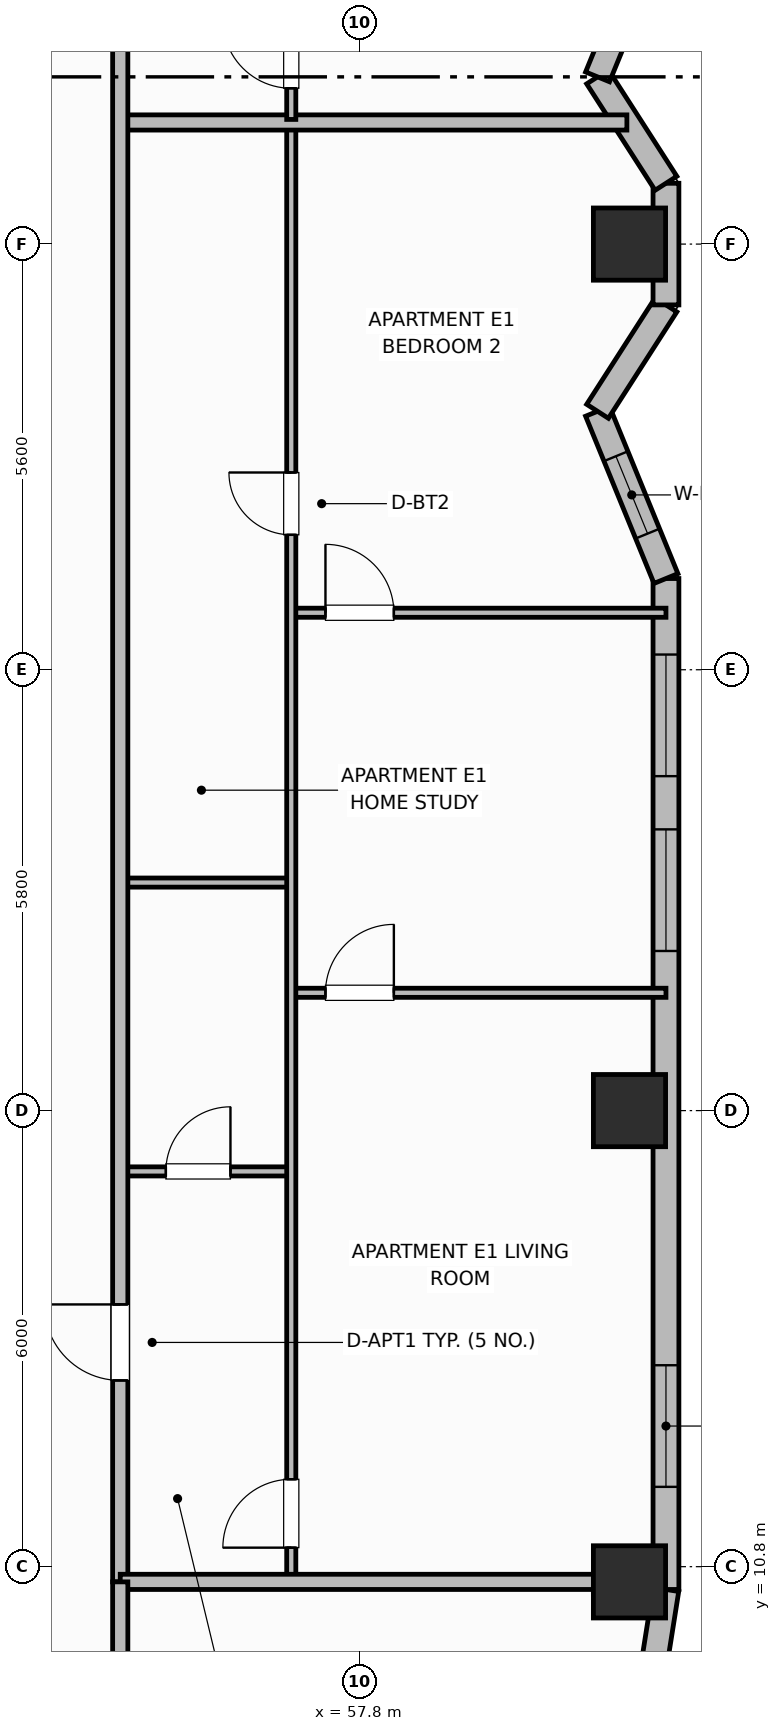
"""IFC4 building model, lengths in metres.
Left out: names, types, materials, properties, quantities, classifications, styles, units other than length and angle.
Written with IfcOpenShell. Run it as: python <this file> out.ifc"""

import sys

from ifc_helpers import new_model, si_unit, direction, frame, frame_2d, origin, origin_2d, place, context, subcontext, project, spatial, rectangle, extrude, element, fill, save


model = new_model("IFC4")
c1 = context("Model", 3, precision=1e-05, world=origin(), true_north=direction((0.0, 1.0)))
c2 = subcontext(c1, "Body", "Model", "MODEL_VIEW")
j1 = project(units=[si_unit("LENGTHUNIT", "METRE"), si_unit("PLANEANGLEUNIT", "RADIAN")], contexts=[c1])
p1 = place(None, origin())
s1 = spatial("IfcSite", under=j1, at=p1, CompositionType="ELEMENT")
p2 = place(p1, origin())
s2 = spatial("IfcBuilding", under=s1, at=p2, CompositionType="ELEMENT")
p3 = place(p2, frame((0.0, 0.0, 162.6)))
s3 = spatial("IfcBuildingStorey", under=s2, at=p3, CompositionType="ELEMENT", Elevation=162.6)
for number, where, z_axis, x_axis in (
    (1, (61.35, 10.6, 0.0), (0.0, 0.0, 1.0), (1.0, 0.0, 0.0)),
    (2, (61.35, 16.8, 0.0), (0.0, 0.0, 1.0), (1.0, 0.0, 0.0)),
    (3, (61.35, 28.2, 0.0), (0.0, 0.0, 1.0), (1.0, 0.0, 0.0)),
):
    element("IfcColumn", number, at=place(p3, frame(where, z_axis=z_axis, x_axis=x_axis)), inside=s3, PredefinedType="COLUMN", context=c2, shape_type="SweptSolid", body=[
        extrude(rectangle(XDim=0.95, YDim=0.95, at=origin_2d()), origin(), (0.0, 0.0, 1.0), 3.7),
    ])
p4 = place(p3, frame((61.652, 9.378, 0.0), z_axis=(0.0, 0.0, 1.0), x_axis=(0.156514556949, 0.987675651954, 0.0)))
e4 = element("IfcWall", 4, at=p4, inside=s3, PredefinedType="SOLIDWALL", context=c2, shape_type="SweptSolid", body=[
    extrude(rectangle(XDim=1.135, YDim=0.34, at=frame_2d((0.568, 0.0))), origin(), (0.0, 0.0, 1.0), 2.72),
])
p5 = place(p3, frame((61.83, 10.5, 0.0), z_axis=(0.0, 0.0, 1.0), x_axis=(0.0, 1.0, 0.0)))
e5 = element("IfcWall", 5, at=p5, inside=s3, PredefinedType="SOLIDWALL", context=c2, shape_type="SweptSolid", body=[
    extrude(rectangle(XDim=13.3, YDim=0.34, at=frame_2d((6.65, 0.0))), origin(), (0.0, 0.0, 1.0), 2.72),
])
p6 = place(p5, frame((1.35, 0.0, 0.7)))
e6 = element("IfcOpeningElement", 6, at=p6, cuts=e5, PredefinedType="OPENING", context=c2, shape_type="SweptSolid", body=[
    extrude(rectangle(XDim=1.6, YDim=1.9, at=frame_2d((0.8, 0.95))), frame((0.0, 0.18, 0.0), z_axis=(0.0, -1.0, 0.0), x_axis=(1.0, 0.0, 0.0)), (0.0, 0.0, 1.0), 0.36),
])
p7 = place(p5, frame((8.4, 0.0, 0.7)))
e7 = element("IfcOpeningElement", 7, at=p7, cuts=e5, PredefinedType="OPENING", context=c2, shape_type="SweptSolid", body=[
    extrude(rectangle(XDim=1.6, YDim=1.9, at=frame_2d((0.8, 0.95))), frame((0.0, 0.18, 0.0), z_axis=(0.0, -1.0, 0.0), x_axis=(1.0, 0.0, 0.0)), (0.0, 0.0, 1.0), 0.36),
])
p8 = place(p5, frame((10.7, 0.0, 0.7)))
e8 = element("IfcOpeningElement", 8, at=p8, cuts=e5, PredefinedType="OPENING", context=c2, shape_type="SweptSolid", body=[
    extrude(rectangle(XDim=1.6, YDim=1.9, at=frame_2d((0.8, 0.95))), frame((0.0, 0.18, 0.0), z_axis=(0.0, -1.0, 0.0), x_axis=(1.0, 0.0, 0.0)), (0.0, 0.0, 1.0), 0.36),
])
p9 = place(p3, frame((61.83, 23.8, 0.0), z_axis=(0.0, 0.0, 1.0), x_axis=(-0.378692835005, 0.925522412865, 0.0)))
e9 = element("IfcWall", 9, at=p9, inside=s3, PredefinedType="SOLIDWALL", context=c2, shape_type="SweptSolid", body=[
    extrude(rectangle(XDim=2.377, YDim=0.34, at=frame_2d((1.188, 0.0))), origin(), (0.0, 0.0, 1.0), 2.72),
])
p10 = place(p9, frame((0.638, 0.0, 0.91)))
e10 = element("IfcOpeningElement", 10, at=p10, cuts=e9, PredefinedType="OPENING", context=c2, shape_type="SweptSolid", body=[
    extrude(rectangle(XDim=1.1, YDim=1.65, at=frame_2d((0.55, 0.825))), frame((0.0, 0.18, 0.0), z_axis=(0.0, -1.0, 0.0), x_axis=(1.0, 0.0, 0.0)), (0.0, 0.0, 1.0), 0.36),
])
p11 = place(p3, frame((60.93, 26.0, 0.0), z_axis=(0.0, 0.0, 1.0), x_axis=(0.540846555596, 0.841121277403, 0.0)))
e11 = element("IfcWall", 11, at=p11, inside=s3, PredefinedType="SOLIDWALL", context=c2, shape_type="SweptSolid", body=[
    extrude(rectangle(XDim=1.664, YDim=0.34, at=frame_2d((0.832, 0.0))), origin(), (0.0, 0.0, 1.0), 2.72),
])
p12 = place(p3, frame((61.83, 27.4, 0.0), z_axis=(0.0, 0.0, 1.0), x_axis=(0.0, 1.0, 0.0)))
e12 = element("IfcWall", 12, at=p12, inside=s3, PredefinedType="SOLIDWALL", context=c2, shape_type="SweptSolid", body=[
    extrude(rectangle(XDim=1.6, YDim=0.34, at=frame_2d((0.8, 0.0))), origin(), (0.0, 0.0, 1.0), 2.72),
])
p13 = place(p3, frame((61.83, 29.0, 0.0), z_axis=(0.0, 0.0, 1.0), x_axis=(-0.540846555596, 0.841121277403, 0.0)))
e13 = element("IfcWall", 13, at=p13, inside=s3, PredefinedType="SOLIDWALL", context=c2, shape_type="SweptSolid", body=[
    extrude(rectangle(XDim=1.664, YDim=0.34, at=frame_2d((0.832, 0.0))), origin(), (0.0, 0.0, 1.0), 2.72),
])
p14 = place(p3, frame((60.93, 30.4, 0.0), z_axis=(0.0, 0.0, 1.0), x_axis=(0.378656839344, 0.925537140269, 0.0)))
e14 = element("IfcWall", 14, at=p14, inside=s3, PredefinedType="SOLIDWALL", context=c2, shape_type="SweptSolid", body=[
    extrude(rectangle(XDim=2.377, YDim=0.34, at=frame_2d((1.188, 0.0))), origin(), (0.0, 0.0, 1.0), 2.72),
])
p15 = place(p14, frame((0.638, 0.0, 0.91)))
e15 = element("IfcOpeningElement", 15, at=p15, cuts=e14, PredefinedType="OPENING", context=c2, shape_type="SweptSolid", body=[
    extrude(rectangle(XDim=1.1, YDim=1.65, at=frame_2d((0.55, 0.825))), frame((0.0, 0.18, 0.0), z_axis=(0.0, -1.0, 0.0), x_axis=(1.0, 0.0, 0.0)), (0.0, 0.0, 1.0), 0.36),
])
p16 = place(p3, frame((54.65, 16.0, 0.0), z_axis=(0.0, 0.0, 1.0), x_axis=(1.0, 0.0, 0.0)))
e16 = element("IfcWall", 16, at=p16, inside=s3, PredefinedType="PARTITIONING", context=c2, shape_type="SweptSolid", body=[
    extrude(rectangle(XDim=2.25, YDim=0.12, at=frame_2d((1.125, 0.0))), origin(), (0.0, 0.0, 1.0), 2.55),
])
p17 = place(p16, frame((0.6, 0.0, 0.0)))
e17 = element("IfcOpeningElement", 17, at=p17, cuts=e16, PredefinedType="OPENING", context=c2, shape_type="SweptSolid", body=[
    extrude(rectangle(XDim=0.85, YDim=2.1, at=frame_2d((0.425, 1.05))), frame((0.0, 0.07, 0.0), z_axis=(0.0, -1.0, 0.0), x_axis=(1.0, 0.0, 0.0)), (0.0, 0.0, 1.0), 0.14),
])
p18 = place(p3, frame((54.65, 19.8, 0.0), z_axis=(0.0, 0.0, 1.0), x_axis=(1.0, 0.0, 0.0)))
e18 = element("IfcWall", 18, at=p18, inside=s3, PredefinedType="PARTITIONING", context=c2, shape_type="SweptSolid", body=[
    extrude(rectangle(XDim=2.25, YDim=0.12, at=frame_2d((1.125, 0.0))), origin(), (0.0, 0.0, 1.0), 2.55),
])
p19 = place(p3, frame((56.9, 18.35, 0.0), z_axis=(0.0, 0.0, 1.0), x_axis=(1.0, 0.0, 0.0)))
e19 = element("IfcWall", 19, at=p19, inside=s3, PredefinedType="PARTITIONING", context=c2, shape_type="SweptSolid", body=[
    extrude(rectangle(XDim=4.93, YDim=0.12, at=frame_2d((2.465, 0.0))), origin(), (0.0, 0.0, 1.0), 2.55),
])
p20 = place(p19, frame((0.45, 0.0, 0.0)))
e20 = element("IfcOpeningElement", 20, at=p20, cuts=e19, PredefinedType="OPENING", context=c2, shape_type="SweptSolid", body=[
    extrude(rectangle(XDim=0.9, YDim=2.1, at=frame_2d((0.45, 1.05))), frame((0.0, 0.07, 0.0), z_axis=(0.0, -1.0, 0.0), x_axis=(1.0, 0.0, 0.0)), (0.0, 0.0, 1.0), 0.14),
])
p21 = place(p3, frame((56.9, 23.35, 0.0), z_axis=(0.0, 0.0, 1.0), x_axis=(1.0, 0.0, 0.0)))
e21 = element("IfcWall", 21, at=p21, inside=s3, PredefinedType="PARTITIONING", context=c2, shape_type="SweptSolid", body=[
    extrude(rectangle(XDim=4.93, YDim=0.12, at=frame_2d((2.465, 0.0))), origin(), (0.0, 0.0, 1.0), 2.55),
])
p22 = place(p21, frame((0.45, 0.0, 0.0)))
e22 = element("IfcOpeningElement", 22, at=p22, cuts=e21, PredefinedType="OPENING", context=c2, shape_type="SweptSolid", body=[
    extrude(rectangle(XDim=0.9, YDim=2.1, at=frame_2d((0.45, 1.05))), frame((0.0, 0.07, 0.0), z_axis=(0.0, -1.0, 0.0), x_axis=(1.0, 0.0, 0.0)), (0.0, 0.0, 1.0), 0.14),
])
p23 = place(p3, frame((56.9, 10.64, 0.0), z_axis=(0.0, 0.0, 1.0), x_axis=(0.0, 1.0, 0.0)))
e23 = element("IfcWall", 23, at=p23, inside=s3, PredefinedType="PARTITIONING", context=c2, shape_type="SweptSolid", body=[
    extrude(rectangle(XDim=19.12, YDim=0.12, at=frame_2d((9.56, 0.0))), origin(), (0.0, 0.0, 1.0), 2.55),
])
p24 = place(p23, frame((0.41, 0.0, 0.0)))
e24 = element("IfcOpeningElement", 24, at=p24, cuts=e23, PredefinedType="OPENING", context=c2, shape_type="SweptSolid", body=[
    extrude(rectangle(XDim=0.9, YDim=2.1, at=frame_2d((0.45, 1.05))), frame((0.0, 0.07, 0.0), z_axis=(0.0, -1.0, 0.0), x_axis=(1.0, 0.0, 0.0)), (0.0, 0.0, 1.0), 0.14),
])
p25 = place(p23, frame((13.735, 0.0, 0.0)))
e25 = element("IfcOpeningElement", 25, at=p25, cuts=e23, PredefinedType="OPENING", context=c2, shape_type="SweptSolid", body=[
    extrude(rectangle(XDim=0.82, YDim=2.08, at=frame_2d((0.41, 1.04))), frame((0.0, 0.07, 0.0), z_axis=(0.0, -1.0, 0.0), x_axis=(1.0, 0.0, 0.0)), (0.0, 0.0, 1.0), 0.14),
])
p26 = place(p3, frame((54.65, 29.8, 0.0), z_axis=(0.0, 0.0, 1.0), x_axis=(1.0, 0.0, 0.0)))
e26 = element("IfcWall", 26, at=p26, inside=s3, PredefinedType="PARTITIONING", context=c2, shape_type="SweptSolid", body=[
    extrude(rectangle(XDim=6.666, YDim=0.2, at=frame_2d((3.333, 0.0))), origin(), (0.0, 0.0, 1.0), 2.55),
])
p27 = place(p3, frame((56.9, 29.84, 0.0), z_axis=(0.0, 0.0, 1.0), x_axis=(0.0, 1.0, 0.0)))
e27 = element("IfcWall", 27, at=p27, inside=s3, PredefinedType="PARTITIONING", context=c2, shape_type="SweptSolid", body=[
    extrude(rectangle(XDim=15.92, YDim=0.12, at=frame_2d((7.96, 0.0))), origin(), (0.0, 0.0, 1.0), 2.55),
])
p28 = place(p27, frame((0.41, 0.0, 0.0)))
e28 = element("IfcOpeningElement", 28, at=p28, cuts=e27, PredefinedType="OPENING", context=c2, shape_type="SweptSolid", body=[
    extrude(rectangle(XDim=0.9, YDim=2.1, at=frame_2d((0.45, 1.05))), frame((0.0, 0.07, 0.0), z_axis=(0.0, -1.0, 0.0), x_axis=(1.0, 0.0, 0.0)), (0.0, 0.0, 1.0), 0.14),
])
p29 = place(p27, frame((13.125, 0.0, 0.0)))
e29 = element("IfcOpeningElement", 29, at=p29, cuts=e27, PredefinedType="OPENING", context=c2, shape_type="SweptSolid", body=[
    extrude(rectangle(XDim=0.82, YDim=2.08, at=frame_2d((0.41, 1.04))), frame((0.0, 0.07, 0.0), z_axis=(0.0, -1.0, 0.0), x_axis=(1.0, 0.0, 0.0)), (0.0, 0.0, 1.0), 0.14),
])
p30 = place(p3, frame((54.65, 10.6, 0.0), z_axis=(0.0, 0.0, 1.0), x_axis=(0.0, 1.0, 0.0)))
e30 = element("IfcWall", 30, at=p30, inside=s3, PredefinedType="PARTITIONING", context=c2, shape_type="SweptSolid", body=[
    extrude(rectangle(XDim=35.2, YDim=0.2, at=frame_2d((17.6, 0.0))), origin(), (0.0, 0.0, 1.0), 2.55),
])
p31 = place(p30, frame((2.65, 0.0, 0.0)))
e31 = element("IfcOpeningElement", 31, at=p31, cuts=e30, PredefinedType="OPENING", context=c2, shape_type="SweptSolid", body=[
    extrude(rectangle(XDim=1.0, YDim=2.15, at=frame_2d((0.5, 1.075))), frame((0.0, 0.11, 0.0), z_axis=(0.0, -1.0, 0.0), x_axis=(1.0, 0.0, 0.0)), (0.0, 0.0, 1.0), 0.22),
])
p32 = place(p30, frame((22.75, 0.0, 0.0)))
e32 = element("IfcOpeningElement", 32, at=p32, cuts=e30, PredefinedType="OPENING", context=c2, shape_type="SweptSolid", body=[
    extrude(rectangle(XDim=1.0, YDim=2.15, at=frame_2d((0.5, 1.075))), frame((0.0, 0.11, 0.0), z_axis=(0.0, -1.0, 0.0), x_axis=(1.0, 0.0, 0.0)), (0.0, 0.0, 1.0), 0.22),
])
p33 = place(p3, frame((54.65, 10.6, 0.0), z_axis=(0.0, 0.0, 1.0), x_axis=(1.0, 0.0, 0.0)))
e33 = element("IfcWall", 33, at=p33, inside=s3, PredefinedType="PARTITIONING", context=c2, shape_type="SweptSolid", body=[
    extrude(rectangle(XDim=6.76, YDim=0.2, at=frame_2d((3.38, 0.0))), origin(), (0.0, 0.0, 1.0), 2.55),
])
p34 = place(p3, frame((54.65, 6.87, 0.0), z_axis=(0.0, 0.0, 1.0), x_axis=(0.0, 1.0, 0.0)))
e34 = element("IfcWall", 34, at=p34, inside=s3, PredefinedType="PARTITIONING", context=c2, shape_type="SweptSolid", body=[
    extrude(rectangle(XDim=3.73, YDim=0.2, at=frame_2d((1.865, 0.0))), origin(), (0.0, 0.0, 1.0), 2.55),
])
p35 = place(p6, origin())
e35 = element("IfcWindow", 35, at=p35, inside=s3, PartitioningType="SINGLE_PANEL", PredefinedType="WINDOW", context=c2, shape_type="SweptSolid", body=[
    extrude(rectangle(XDim=1.6, YDim=1.9, at=frame_2d((0.8, 0.95))), frame((0.0, 0.03, 0.0), z_axis=(0.0, -1.0, 0.0), x_axis=(1.0, 0.0, 0.0)), (0.0, 0.0, 1.0), 0.06),
])
fill(e6, e35)
p36 = place(p7, origin())
e36 = element("IfcWindow", 36, at=p36, inside=s3, PartitioningType="SINGLE_PANEL", PredefinedType="WINDOW", context=c2, shape_type="SweptSolid", body=[
    extrude(rectangle(XDim=1.6, YDim=1.9, at=frame_2d((0.8, 0.95))), frame((0.0, 0.03, 0.0), z_axis=(0.0, -1.0, 0.0), x_axis=(1.0, 0.0, 0.0)), (0.0, 0.0, 1.0), 0.06),
])
fill(e7, e36)
p37 = place(p8, origin())
e37 = element("IfcWindow", 37, at=p37, inside=s3, PartitioningType="SINGLE_PANEL", PredefinedType="WINDOW", context=c2, shape_type="SweptSolid", body=[
    extrude(rectangle(XDim=1.6, YDim=1.9, at=frame_2d((0.8, 0.95))), frame((0.0, 0.03, 0.0), z_axis=(0.0, -1.0, 0.0), x_axis=(1.0, 0.0, 0.0)), (0.0, 0.0, 1.0), 0.06),
])
fill(e8, e37)
p38 = place(p10, origin())
e38 = element("IfcWindow", 38, at=p38, inside=s3, PartitioningType="SINGLE_PANEL", PredefinedType="WINDOW", context=c2, shape_type="SweptSolid", body=[
    extrude(rectangle(XDim=1.1, YDim=1.65, at=frame_2d((0.55, 0.825))), frame((0.0, 0.03, 0.0), z_axis=(0.0, -1.0, 0.0), x_axis=(1.0, 0.0, 0.0)), (0.0, 0.0, 1.0), 0.06),
])
fill(e10, e38)
p39 = place(p17, origin())
e39 = element("IfcDoor", 39, at=p39, inside=s3, OperationType="SINGLE_SWING_RIGHT", PredefinedType="DOOR", context=c2, shape_type="SweptSolid", body=[
    extrude(rectangle(XDim=0.85, YDim=2.1, at=frame_2d((0.425, 1.05))), frame((0.0, 0.025, 0.0), z_axis=(0.0, -1.0, 0.0), x_axis=(1.0, 0.0, 0.0)), (0.0, 0.0, 1.0), 0.05),
])
fill(e17, e39)
p40 = place(p20, origin())
e40 = element("IfcDoor", 40, at=p40, inside=s3, OperationType="SINGLE_SWING_RIGHT", PredefinedType="DOOR", context=c2, shape_type="SweptSolid", body=[
    extrude(rectangle(XDim=0.9, YDim=2.1, at=frame_2d((0.45, 1.05))), frame((0.0, 0.025, 0.0), z_axis=(0.0, -1.0, 0.0), x_axis=(1.0, 0.0, 0.0)), (0.0, 0.0, 1.0), 0.05),
])
fill(e20, e40)
p41 = place(p22, origin())
e41 = element("IfcDoor", 41, at=p41, inside=s3, OperationType="SINGLE_SWING_LEFT", PredefinedType="DOOR", context=c2, shape_type="SweptSolid", body=[
    extrude(rectangle(XDim=0.9, YDim=2.1, at=frame_2d((0.45, 1.05))), frame((0.0, 0.025, 0.0), z_axis=(0.0, -1.0, 0.0), x_axis=(1.0, 0.0, 0.0)), (0.0, 0.0, 1.0), 0.05),
])
fill(e22, e41)
p42 = place(p24, origin())
e42 = element("IfcDoor", 42, at=p42, inside=s3, OperationType="SINGLE_SWING_LEFT", PredefinedType="DOOR", context=c2, shape_type="SweptSolid", body=[
    extrude(rectangle(XDim=0.9, YDim=2.1, at=frame_2d((0.45, 1.05))), frame((0.0, 0.025, 0.0), z_axis=(0.0, -1.0, 0.0), x_axis=(1.0, 0.0, 0.0)), (0.0, 0.0, 1.0), 0.05),
])
fill(e24, e42)
p43 = place(p25, origin())
e43 = element("IfcDoor", 43, at=p43, inside=s3, OperationType="SINGLE_SWING_RIGHT", PredefinedType="DOOR", context=c2, shape_type="SweptSolid", body=[
    extrude(rectangle(XDim=0.82, YDim=2.08, at=frame_2d((0.41, 1.04))), frame((0.0, 0.025, 0.0), z_axis=(0.0, -1.0, 0.0), x_axis=(1.0, 0.0, 0.0)), (0.0, 0.0, 1.0), 0.05),
])
fill(e25, e43)
p44 = place(p28, origin())
e44 = element("IfcDoor", 44, at=p44, inside=s3, OperationType="SINGLE_SWING_RIGHT", PredefinedType="DOOR", context=c2, shape_type="SweptSolid", body=[
    extrude(rectangle(XDim=0.9, YDim=2.1, at=frame_2d((0.45, 1.05))), frame((0.0, 0.025, 0.0), z_axis=(0.0, -1.0, 0.0), x_axis=(1.0, 0.0, 0.0)), (0.0, 0.0, 1.0), 0.05),
])
fill(e28, e44)
p45 = place(p31, origin())
e45 = element("IfcDoor", 45, at=p45, inside=s3, OperationType="SINGLE_SWING_RIGHT", PredefinedType="DOOR", context=c2, shape_type="SweptSolid", body=[
    extrude(rectangle(XDim=1.0, YDim=2.15, at=frame_2d((0.5, 1.075))), frame((0.0, 0.025, 0.0), z_axis=(0.0, -1.0, 0.0), x_axis=(1.0, 0.0, 0.0)), (0.0, 0.0, 1.0), 0.05),
])
fill(e31, e45)
save(model, sys.argv[1])
